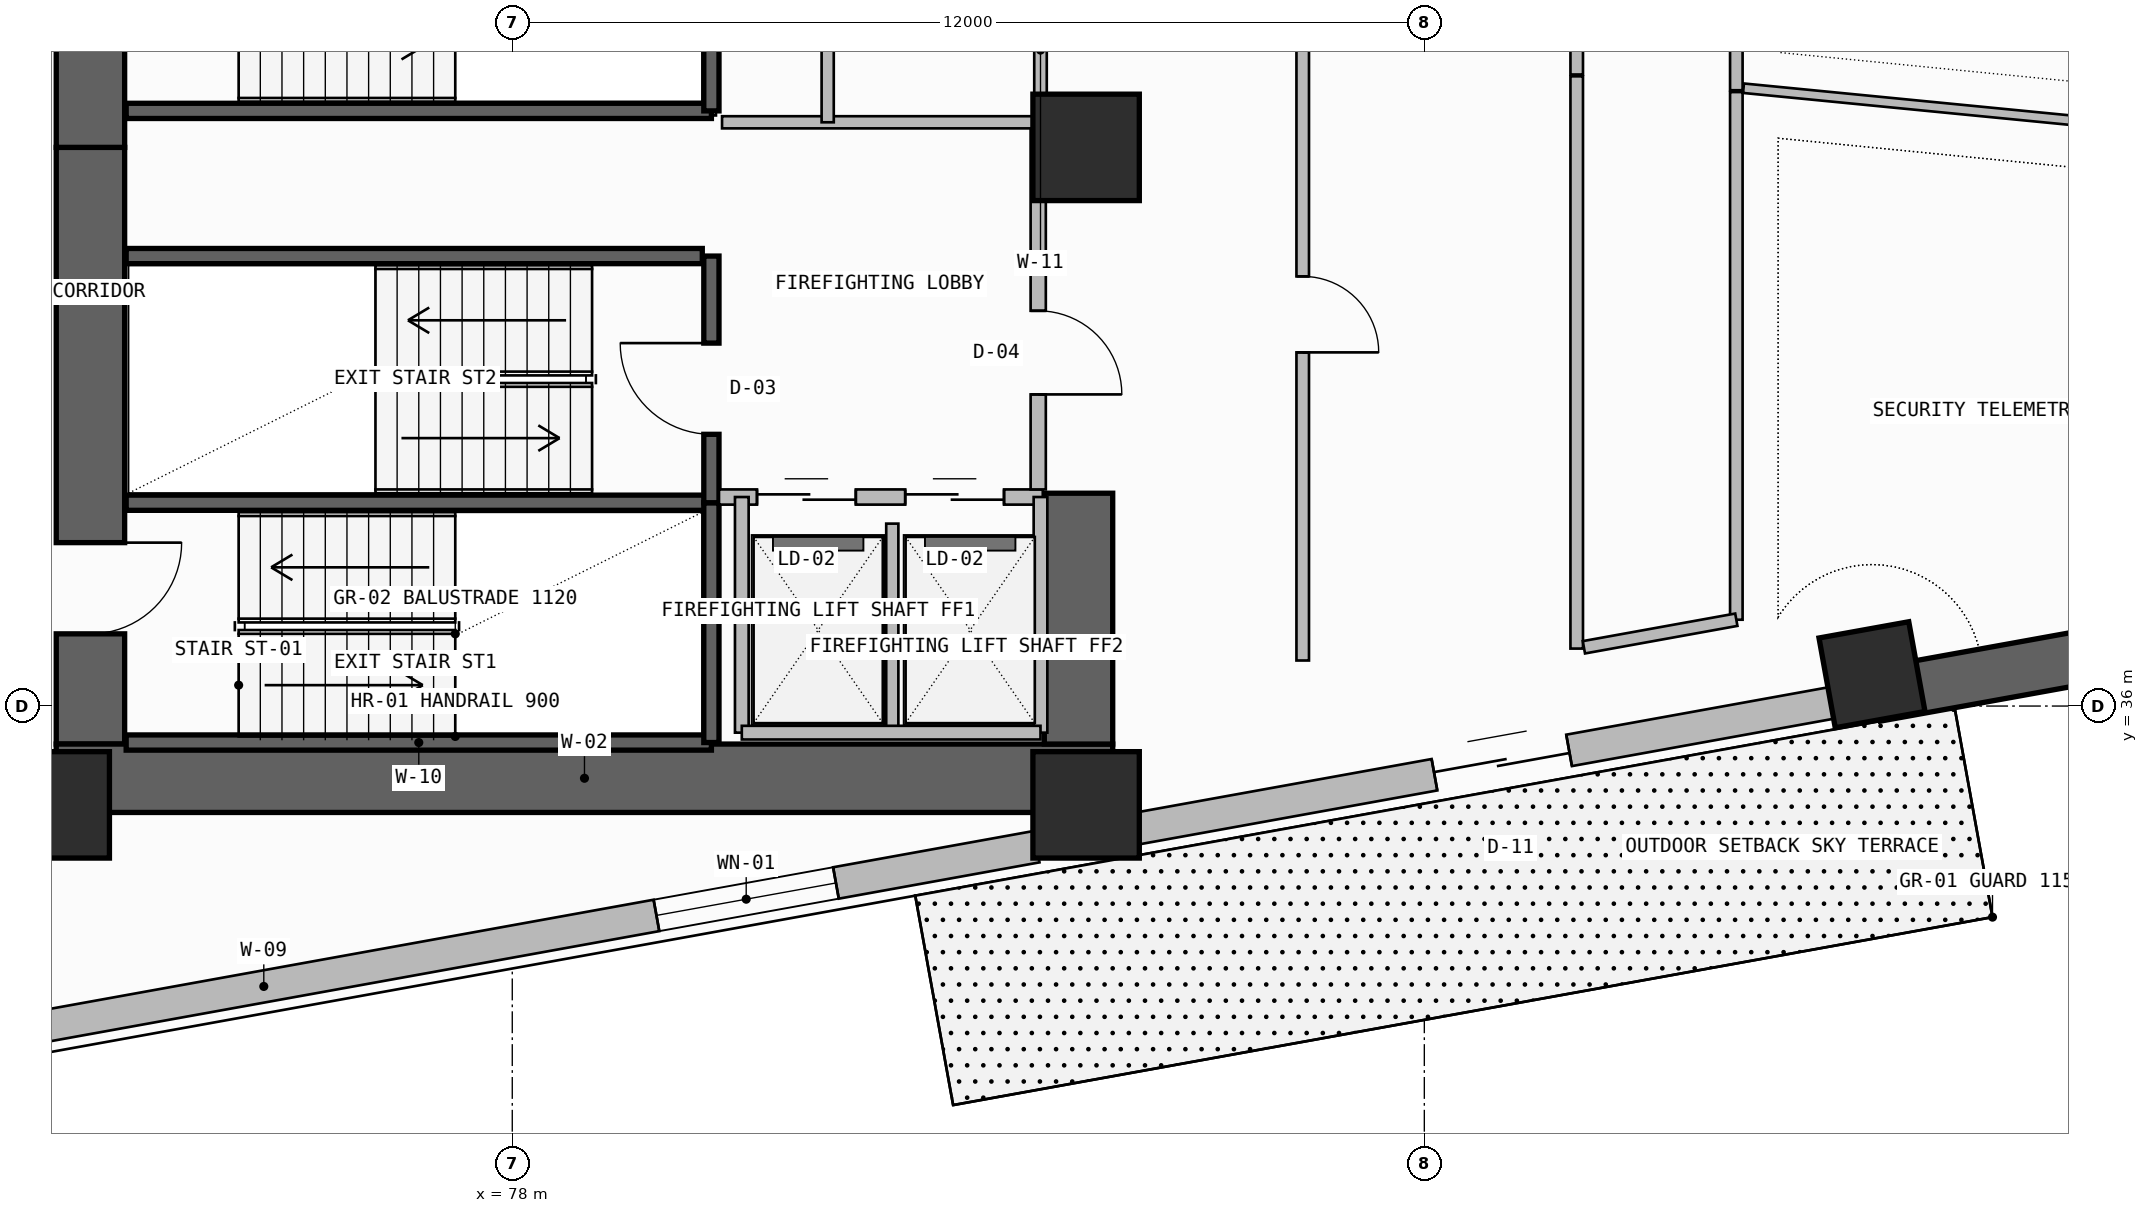
"""IFC4 building model, lengths in metres.
Left out: names, types, materials, properties, quantities, classifications, styles, units other than length and angle.
Written with IfcOpenShell. Run it as: python <this file> out.ifc"""

import sys

from ifc_helpers import new_model, si_unit, direction, frame, frame_2d, origin, origin_2d, place, context, subcontext, project, spatial, rectangle, extrude, element, fill, save


model = new_model("IFC4")
c1 = context("Model", 3, precision=1e-05, world=origin(), true_north=direction((0.0, 1.0)))
c2 = subcontext(c1, "Body", "Model", "MODEL_VIEW")
j1 = project(units=[si_unit("LENGTHUNIT", "METRE"), si_unit("PLANEANGLEUNIT", "RADIAN")], contexts=[c1])
p1 = place(None, origin())
s1 = spatial("IfcSite", under=j1, at=p1, CompositionType="ELEMENT")
p2 = place(p1, origin())
s2 = spatial("IfcBuilding", under=s1, at=p2, CompositionType="ELEMENT")
p3 = place(p2, frame((0.0, 0.0, 95.7)))
s3 = spatial("IfcBuildingStorey", under=s2, at=p3, CompositionType="ELEMENT", Elevation=95.7)
p4 = place(p3, frame((72.45, 35.5, -0.4), z_axis=(0.0, 0.0, 1.0), x_axis=(0.0, 1.0, 0.0)))
e1 = element("IfcWall", 1, at=p4, inside=s3, PredefinedType="SHEAR", context=c2, shape_type="SweptSolid", body=[
    extrude(rectangle(XDim=7.85, YDim=0.9, at=frame_2d((3.925, 0.0))), origin(), (0.0, 0.0, 1.0), 3.74),
])
p5 = place(p4, frame((1.45, 0.0, 0.4)))
e2 = element("IfcOpeningElement", 2, at=p5, cuts=e1, PredefinedType="OPENING", context=c2, shape_type="SweptSolid", body=[
    extrude(rectangle(XDim=1.2, YDim=2.2, at=frame_2d((0.6, 1.1))), frame((0.0, 0.46, 0.0), z_axis=(0.0, -1.0, 0.0), x_axis=(1.0, 0.0, 0.0)), (0.0, 0.0, 1.0), 0.92),
])
p6 = place(p3, frame((72.0, 35.05, -0.4), z_axis=(0.0, 0.0, 1.0), x_axis=(1.0, 0.0, 0.0)))
e3 = element("IfcWall", 3, at=p6, inside=s3, PredefinedType="SHEAR", context=c2, shape_type="SweptSolid", body=[
    extrude(rectangle(XDim=13.9, YDim=0.9, at=frame_2d((6.95, 0.0))), origin(), (0.0, 0.0, 1.0), 3.74),
])
p7 = place(p3, frame((85.45, 35.5, -0.4), z_axis=(0.0, 0.0, 1.0), x_axis=(0.0, 1.0, 0.0)))
e4 = element("IfcWall", 4, at=p7, inside=s3, PredefinedType="SHEAR", context=c2, shape_type="SweptSolid", body=[
    extrude(rectangle(XDim=3.3, YDim=0.9, at=frame_2d((1.65, 0.0))), origin(), (0.0, 0.0, 1.0), 3.74),
])
p8 = place(p3, frame((72.45, 43.35, -0.4), z_axis=(0.0, 0.0, 1.0), x_axis=(0.0, 1.0, 0.0)))
e5 = element("IfcWall", 5, at=p8, inside=s3, PredefinedType="SHEAR", context=c2, shape_type="SweptSolid", body=[
    extrude(rectangle(XDim=12.7, YDim=0.9, at=frame_2d((6.35, 0.0))), origin(), (0.0, 0.0, 1.0), 3.74),
])
p9 = place(p8, frame((1.35, 0.0, 0.4)))
e6 = element("IfcOpeningElement", 6, at=p9, cuts=e5, PredefinedType="OPENING", context=c2, shape_type="SweptSolid", body=[
    extrude(rectangle(XDim=1.2, YDim=2.2, at=frame_2d((0.6, 1.1))), frame((0.0, 0.46, 0.0), z_axis=(0.0, -1.0, 0.0), x_axis=(1.0, 0.0, 0.0)), (0.0, 0.0, 1.0), 0.92),
])
for number, where, z_axis, x_axis in (
    (7, (72.0, 34.7, 0.0), (0.0, 0.0, 1.0), (1.0, 0.0, 0.0)),
    (8, (85.55, 34.7, 0.0), (0.0, 0.0, 1.0), (1.0, 0.0, 0.0)),
    (9, (85.55, 43.35, 0.0), (0.0, 0.0, 1.0), (1.0, 0.0, 0.0)),
):
    element("IfcColumn", number, at=place(p3, frame(where, z_axis=z_axis, x_axis=x_axis)), inside=s3, PredefinedType="COLUMN", context=c2, shape_type="SweptSolid", body=[
        extrude(rectangle(XDim=1.4, YDim=1.4, at=origin_2d()), origin(), (0.0, 0.0, 1.0), 3.6),
    ])
p10 = place(p3, frame((95.89, 36.412, -0.4), z_axis=(0.0, 0.0, 1.0), x_axis=(0.984040697646, 0.177943545474, 0.0)))
e10 = element("IfcColumn", 10, at=p10, inside=s3, PredefinedType="COLUMN", context=c2, shape_type="SweptSolid", body=[
    extrude(rectangle(XDim=1.2, YDim=1.2, at=origin_2d()), origin(), (0.0, 0.0, 1.0), 4.0),
])
p11 = place(p3, frame((69.565, 31.377, 0.0), z_axis=(0.0, 0.0, 1.0), x_axis=(0.98404091451, 0.177942346197, 0.0)))
e11 = element("IfcWall", 11, at=p11, inside=s3, PredefinedType="SOLIDWALL", context=c2, shape_type="SweptSolid", body=[
    extrude(rectangle(XDim=15.583, YDim=0.42, at=frame_2d((7.792, 0.0))), origin(), (0.0, 0.0, 1.0), 3.34),
])
p12 = place(p11, frame((10.5, 0.0, 1.2)))
e12 = element("IfcOpeningElement", 12, at=p12, cuts=e11, PredefinedType="OPENING", context=c2, shape_type="SweptSolid", body=[
    extrude(rectangle(XDim=2.4, YDim=0.9, at=frame_2d((1.2, 0.45))), frame((0.0, 0.22, 0.0), z_axis=(0.0, -1.0, 0.0), x_axis=(1.0, 0.0, 0.0)), (0.0, 0.0, 1.0), 0.44),
])
p13 = place(p3, frame((86.1, 34.367, 0.0), z_axis=(0.0, 0.0, 1.0), x_axis=(0.9840437071, 0.177926902172, 0.0)))
e13 = element("IfcWall", 13, at=p13, inside=s3, PredefinedType="SOLIDWALL", context=c2, shape_type="SweptSolid", body=[
    extrude(rectangle(XDim=9.997, YDim=0.42, at=frame_2d((4.999, 0.0))), origin(), (0.0, 0.0, 1.0), 2.725),
])
p14 = place(p13, frame((4.099, 0.0, 0.0)))
e14 = element("IfcOpeningElement", 14, at=p14, cuts=e13, PredefinedType="OPENING", context=c2, shape_type="SweptSolid", body=[
    extrude(rectangle(XDim=1.8, YDim=2.35, at=frame_2d((0.9, 1.175))), frame((0.0, 0.22, 0.0), z_axis=(0.0, -1.0, 0.0), x_axis=(1.0, 0.0, 0.0)), (0.0, 0.0, 1.0), 0.44),
])
p15 = place(p3, frame((95.938, 36.146, -0.4), z_axis=(0.0, 0.0, 1.0), x_axis=(0.984038488288, 0.177955762952, 0.0)))
e15 = element("IfcWall", 15, at=p15, inside=s3, PredefinedType="SHEAR", context=c2, shape_type="SweptSolid", body=[
    extrude(rectangle(XDim=16.525, YDim=0.7, at=frame_2d((8.262, 0.0))), origin(), (0.0, 0.0, 1.0), 3.74),
])
p16 = place(p15, frame((11.2, 0.0, 1.2)))
e16 = element("IfcOpeningElement", 16, at=p16, cuts=e15, PredefinedType="OPENING", context=c2, shape_type="SweptSolid", body=[
    extrude(rectangle(XDim=2.4, YDim=0.9, at=frame_2d((1.2, 0.45))), frame((0.0, 0.36, 0.0), z_axis=(0.0, -1.0, 0.0), x_axis=(1.0, 0.0, 0.0)), (0.0, 0.0, 1.0), 0.72),
])
p17 = place(p3, frame((119.865, 43.07, 0.0), z_axis=(0.0, 0.0, 1.0), x_axis=(-0.852110824326, 0.52336138859, 0.0)))
e17 = element("IfcWall", 17, at=p17, inside=s3, PredefinedType="PARAPET", context=c2, shape_type="SweptSolid", body=[
    extrude(rectangle(XDim=33.932, YDim=0.2, at=frame_2d((16.966, 0.0))), origin(), (0.0, 0.0, 1.0), 1.15),
])
for number, where, z_axis, x_axis in (
    (18, (72.92, 35.52, -0.4), (0.0, 0.0, 1.0), (1.0, 0.0, 0.0)),
    (19, (72.92, 38.675, -0.4), (0.0, 0.0, 1.0), (1.0, 0.0, 0.0)),
):
    element("IfcWall", number, at=place(p3, frame(where, z_axis=z_axis, x_axis=x_axis)), inside=s3, PredefinedType="SOLIDWALL", context=c2, shape_type="SweptSolid", body=[
        extrude(rectangle(XDim=7.7, YDim=0.2, at=frame_2d((3.85, 0.0))), origin(), (0.0, 0.0, 1.0), 3.74),
    ])
p18 = place(p3, frame((80.62, 35.52, -0.4), z_axis=(0.0, 0.0, 1.0), x_axis=(0.0, 1.0, 0.0)))
e20 = element("IfcWall", 20, at=p18, inside=s3, PredefinedType="SOLIDWALL", context=c2, shape_type="SweptSolid", body=[
    extrude(rectangle(XDim=3.155, YDim=0.2, at=frame_2d((1.578, 0.0))), origin(), (0.0, 0.0, 1.0), 3.74),
])
p19 = place(p3, frame((80.62, 38.675, -0.4), z_axis=(0.0, 0.0, 1.0), x_axis=(0.0, 1.0, 0.0)))
e21 = element("IfcWall", 21, at=p19, inside=s3, PredefinedType="SOLIDWALL", context=c2, shape_type="SweptSolid", body=[
    extrude(rectangle(XDim=3.245, YDim=0.2, at=frame_2d((1.623, 0.0))), origin(), (0.0, 0.0, 1.0), 3.74),
])
p20 = place(p19, frame((0.9, 0.0, 0.4)))
e22 = element("IfcOpeningElement", 22, at=p20, cuts=e21, PredefinedType="OPENING", context=c2, shape_type="SweptSolid", body=[
    extrude(rectangle(XDim=1.2, YDim=2.2, at=frame_2d((0.6, 1.1))), frame((0.0, 0.11, 0.0), z_axis=(0.0, -1.0, 0.0), x_axis=(1.0, 0.0, 0.0)), (0.0, 0.0, 1.0), 0.22),
])
p21 = place(p3, frame((80.72, 38.75, 0.0), z_axis=(0.0, 0.0, 1.0), x_axis=(1.0, 0.0, 0.0)))
e23 = element("IfcWall", 23, at=p21, inside=s3, PredefinedType="SOLIDWALL", context=c2, shape_type="SweptSolid", body=[
    extrude(rectangle(XDim=4.26, YDim=0.2, at=frame_2d((2.13, 0.0))), origin(), (0.0, 0.0, 1.0), 3.34),
])
p22 = place(p21, frame((0.5, 0.0, 0.0)))
e24 = element("IfcOpeningElement", 24, at=p22, cuts=e23, PredefinedType="OPENING", context=c2, shape_type="SweptSolid", body=[
    extrude(rectangle(XDim=1.3, YDim=2.3, at=frame_2d((0.65, 1.15))), frame((0.0, 0.11, 0.0), z_axis=(0.0, -1.0, 0.0), x_axis=(1.0, 0.0, 0.0)), (0.0, 0.0, 1.0), 0.22),
])
p23 = place(p21, frame((2.45, 0.0, 0.0)))
e25 = element("IfcOpeningElement", 25, at=p23, cuts=e23, PredefinedType="OPENING", context=c2, shape_type="SweptSolid", body=[
    extrude(rectangle(XDim=1.3, YDim=2.3, at=frame_2d((0.65, 1.15))), frame((0.0, 0.11, 0.0), z_axis=(0.0, -1.0, 0.0), x_axis=(1.0, 0.0, 0.0)), (0.0, 0.0, 1.0), 0.22),
])
p24 = place(p3, frame((83.0, 35.65, 0.0), z_axis=(0.0, 0.0, 1.0), x_axis=(0.0, 1.0, 0.0)))
e26 = element("IfcWall", 26, at=p24, inside=s3, PredefinedType="PLUMBINGWALL", context=c2, shape_type="SweptSolid", body=[
    extrude(rectangle(XDim=2.75, YDim=0.16, at=frame_2d((1.375, 0.0))), origin(), (0.0, 0.0, 1.0), 3.34),
])
for number, where, z_axis, x_axis in (
    (27, (84.95, 35.65, 0.0), (0.0, 0.0, 1.0), (0.0, 1.0, 0.0)),
    (28, (81.02, 35.65, 0.0), (0.0, 0.0, 1.0), (0.0, 1.0, 0.0)),
):
    element("IfcWall", number, at=place(p3, frame(where, z_axis=z_axis, x_axis=x_axis)), inside=s3, PredefinedType="SOLIDWALL", context=c2, shape_type="SweptSolid", body=[
        extrude(rectangle(XDim=3.1, YDim=0.18, at=frame_2d((1.55, 0.0))), origin(), (0.0, 0.0, 1.0), 3.34),
    ])
p25 = place(p3, frame((81.02, 35.65, 0.0), z_axis=(0.0, 0.0, 1.0), x_axis=(1.0, 0.0, 0.0)))
e29 = element("IfcWall", 29, at=p25, inside=s3, PredefinedType="SOLIDWALL", context=c2, shape_type="SweptSolid", body=[
    extrude(rectangle(XDim=3.93, YDim=0.18, at=frame_2d((1.965, 0.0))), origin(), (0.0, 0.0, 1.0), 3.34),
])
p26 = place(p3, frame((84.92, 38.85, 0.0), z_axis=(0.0, 0.0, 1.0), x_axis=(0.0, 1.0, 0.0)))
e30 = element("IfcWall", 30, at=p26, inside=s3, PredefinedType="SOLIDWALL", context=c2, shape_type="SweptSolid", body=[
    extrude(rectangle(XDim=4.83, YDim=0.2, at=frame_2d((2.415, 0.0))), origin(), (0.0, 0.0, 1.0), 3.34),
])
p27 = place(p26, frame((1.25, 0.0, 0.0)))
e31 = element("IfcOpeningElement", 31, at=p27, cuts=e30, PredefinedType="OPENING", context=c2, shape_type="SweptSolid", body=[
    extrude(rectangle(XDim=1.1, YDim=2.2, at=frame_2d((0.55, 1.1))), frame((0.0, 0.11, 0.0), z_axis=(0.0, -1.0, 0.0), x_axis=(1.0, 0.0, 0.0)), (0.0, 0.0, 1.0), 0.22),
])
p28 = place(p3, frame((72.92, 41.92, -0.4), z_axis=(0.0, 0.0, 1.0), x_axis=(1.0, 0.0, 0.0)))
e32 = element("IfcWall", 32, at=p28, inside=s3, PredefinedType="SOLIDWALL", context=c2, shape_type="SweptSolid", body=[
    extrude(rectangle(XDim=7.58, YDim=0.2, at=frame_2d((3.79, 0.0))), origin(), (0.0, 0.0, 1.0), 3.74),
])
p29 = place(p3, frame((72.92, 43.83, -0.4), z_axis=(0.0, 0.0, 1.0), x_axis=(1.0, 0.0, 0.0)))
e33 = element("IfcWall", 33, at=p29, inside=s3, PredefinedType="SOLIDWALL", context=c2, shape_type="SweptSolid", body=[
    extrude(rectangle(XDim=7.7, YDim=0.2, at=frame_2d((3.85, 0.0))), origin(), (0.0, 0.0, 1.0), 3.74),
])
p30 = place(p3, frame((80.62, 43.83, -0.4), z_axis=(0.0, 0.0, 1.0), x_axis=(0.0, 1.0, 0.0)))
e34 = element("IfcWall", 34, at=p30, inside=s3, PredefinedType="SOLIDWALL", context=c2, shape_type="SweptSolid", body=[
    extrude(rectangle(XDim=3.24, YDim=0.2, at=frame_2d((1.62, 0.0))), origin(), (0.0, 0.0, 1.0), 3.74),
])
p31 = place(p3, frame((84.95, 43.68, 0.0), z_axis=(0.0, 0.0, 1.0), x_axis=(0.0, 1.0, 0.0)))
e35 = element("IfcWall", 35, at=p31, inside=s3, PredefinedType="PLUMBINGWALL", context=c2, shape_type="SweptSolid", body=[
    extrude(rectangle(XDim=1.9, YDim=0.165, at=frame_2d((0.95, 0.0))), origin(), (0.0, 0.0, 1.0), 3.34),
])
p32 = place(p3, frame((80.76, 43.68, 0.0), z_axis=(0.0, 0.0, 1.0), x_axis=(1.0, 0.0, 0.0)))
e36 = element("IfcWall", 36, at=p32, inside=s3, PredefinedType="PLUMBINGWALL", context=c2, shape_type="SweptSolid", body=[
    extrude(rectangle(XDim=4.19, YDim=0.16, at=frame_2d((2.095, 0.0))), origin(), (0.0, 0.0, 1.0), 3.34),
])
p33 = place(p3, frame((82.15, 43.68, 0.0), z_axis=(0.0, 0.0, 1.0), x_axis=(0.0, 1.0, 0.0)))
e37 = element("IfcWall", 37, at=p33, inside=s3, PredefinedType="PLUMBINGWALL", context=c2, shape_type="SweptSolid", body=[
    extrude(rectangle(XDim=1.9, YDim=0.16, at=frame_2d((0.95, 0.0))), origin(), (0.0, 0.0, 1.0), 3.34),
])
p34 = place(p3, frame((94.105, 44.102, 0.0), z_axis=(0.0, 0.0, 1.0), x_axis=(0.0, 1.0, 0.0)))
e38 = element("IfcWall", 38, at=p34, inside=s3, PredefinedType="PARTITIONING", context=c2, shape_type="SweptSolid", body=[
    extrude(rectangle(XDim=6.942, YDim=0.165, at=frame_2d((3.471, 0.0))), origin(), (0.0, 0.0, 1.0), 2.725),
])
p35 = place(p34, frame((2.971, 0.0, 0.0)))
e39 = element("IfcOpeningElement", 39, at=p35, cuts=e38, PredefinedType="OPENING", context=c2, shape_type="SweptSolid", body=[
    extrude(rectangle(XDim=1.0, YDim=2.2, at=frame_2d((0.5, 1.1))), frame((0.0, 0.093, 0.0), z_axis=(0.0, -1.0, 0.0), x_axis=(1.0, 0.0, 0.0)), (0.0, 0.0, 1.0), 0.185),
])
p36 = place(p3, frame((118.119, 41.79, 0.0), z_axis=(0.0, 0.0, 1.0), x_axis=(-0.995255314979, 0.097297780071, 0.0)))
e40 = element("IfcWall", 40, at=p36, inside=s3, PredefinedType="PARTITIONING", context=c2, shape_type="SweptSolid", body=[
    extrude(rectangle(XDim=24.033, YDim=0.125, at=frame_2d((12.017, 0.0))), origin(), (0.0, 0.0, 1.0), 2.725),
])
p37 = place(p3, frame((88.4, 36.599, 0.0), z_axis=(0.0, 0.0, 1.0), x_axis=(0.0, 1.0, 0.0)))
e41 = element("IfcWall", 41, at=p37, inside=s3, PredefinedType="PARTITIONING", context=c2, shape_type="SweptSolid", body=[
    extrude(rectangle(XDim=12.411, YDim=0.165, at=frame_2d((6.205, 0.0))), origin(), (0.0, 0.0, 1.0), 2.725),
])
p38 = place(p37, frame((4.054, 0.0, 0.0)))
e42 = element("IfcOpeningElement", 42, at=p38, cuts=e41, PredefinedType="OPENING", context=c2, shape_type="SweptSolid", body=[
    extrude(rectangle(XDim=1.0, YDim=2.2, at=frame_2d((0.5, 1.1))), frame((0.0, 0.093, 0.0), z_axis=(0.0, -1.0, 0.0), x_axis=(1.0, 0.0, 0.0)), (0.0, 0.0, 1.0), 0.185),
])
p39 = place(p3, frame((92.005, 44.285, 0.0), z_axis=(0.0, 0.0, 1.0), x_axis=(0.0, -1.0, 0.0)))
e43 = element("IfcWall", 43, at=p39, inside=s3, PredefinedType="PARTITIONING", context=c2, shape_type="SweptSolid", body=[
    extrude(rectangle(XDim=7.529, YDim=0.165, at=frame_2d((3.764, 0.0))), origin(), (0.0, 0.0, 1.0), 2.725),
])
p40 = place(p3, frame((94.105, 37.136, 0.0), z_axis=(0.0, 0.0, 1.0), x_axis=(0.0, 1.0, 0.0)))
e44 = element("IfcWall", 44, at=p40, inside=s3, PredefinedType="PARTITIONING", context=c2, shape_type="SweptSolid", body=[
    extrude(rectangle(XDim=6.942, YDim=0.165, at=frame_2d((3.471, 0.0))), origin(), (0.0, 0.0, 1.0), 2.725),
])
p41 = place(p3, frame((92.005, 50.295, 0.0), z_axis=(0.0, 0.0, 1.0), x_axis=(0.0, -1.0, 0.0)))
e45 = element("IfcWall", 45, at=p41, inside=s3, PredefinedType="PARTITIONING", context=c2, shape_type="SweptSolid", body=[
    extrude(rectangle(XDim=5.986, YDim=0.165, at=frame_2d((2.993, 0.0))), origin(), (0.0, 0.0, 1.0), 2.725),
])
p42 = place(p3, frame((92.1, 36.773, 0.0), z_axis=(0.0, 0.0, 1.0), x_axis=(0.984047685875, 0.17790489573, 0.0)))
e46 = element("IfcWall", 46, at=p42, inside=s3, PredefinedType="PARTITIONING", context=c2, shape_type="SweptSolid", body=[
    extrude(rectangle(XDim=2.038, YDim=0.165, at=frame_2d((1.019, 0.0))), origin(), (0.0, 0.0, 1.0), 3.34),
])
p43 = place(p12, origin())
e47 = element("IfcWindow", 47, at=p43, inside=s3, PartitioningType="SINGLE_PANEL", PredefinedType="WINDOW", context=c2, shape_type="SweptSolid", body=[
    extrude(rectangle(XDim=2.4, YDim=0.9, at=frame_2d((1.2, 0.45))), frame((0.0, 0.03, 0.0), z_axis=(0.0, -1.0, 0.0), x_axis=(1.0, 0.0, 0.0)), (0.0, 0.0, 1.0), 0.06),
])
fill(e12, e47)
p44 = place(p14, origin())
e48 = element("IfcDoor", 48, at=p44, inside=s3, OperationType="DOUBLE_DOOR_SLIDING", PredefinedType="DOOR", context=c2, shape_type="SweptSolid", body=[
    extrude(rectangle(XDim=1.8, YDim=2.35, at=frame_2d((0.9, 1.175))), frame((0.0, 0.025, 0.0), z_axis=(0.0, -1.0, 0.0), x_axis=(1.0, 0.0, 0.0)), (0.0, 0.0, 1.0), 0.05),
])
fill(e14, e48)
p45 = place(p5, frame((1.2, 0.0, 0.0), z_axis=(0.0, 0.0, 1.0), x_axis=(-1.0, 0.0, 0.0)))
e49 = element("IfcDoor", 49, at=p45, inside=s3, OperationType="SINGLE_SWING_LEFT", PredefinedType="USERDEFINED", context=c2, shape_type="SweptSolid", body=[
    extrude(rectangle(XDim=1.2, YDim=2.2, at=frame_2d((0.6, 1.1))), frame((0.0, 0.025, 0.0), z_axis=(0.0, -1.0, 0.0), x_axis=(1.0, 0.0, 0.0)), (0.0, 0.0, 1.0), 0.05),
])
fill(e2, e49)
p46 = place(p20, origin())
e50 = element("IfcDoor", 50, at=p46, inside=s3, OperationType="SINGLE_SWING_RIGHT", PredefinedType="USERDEFINED", context=c2, shape_type="SweptSolid", body=[
    extrude(rectangle(XDim=1.2, YDim=2.2, at=frame_2d((0.6, 1.1))), frame((0.0, 0.025, 0.0), z_axis=(0.0, -1.0, 0.0), x_axis=(1.0, 0.0, 0.0)), (0.0, 0.0, 1.0), 0.05),
])
fill(e22, e50)
p47 = place(p22, origin())
e51 = element("IfcDoor", 51, at=p47, inside=s3, OperationType="DOUBLE_DOOR_SLIDING", PredefinedType="DOOR", context=c2, shape_type="SweptSolid", body=[
    extrude(rectangle(XDim=1.3, YDim=2.3, at=frame_2d((0.65, 1.15))), frame((0.0, 0.025, 0.0), z_axis=(0.0, -1.0, 0.0), x_axis=(1.0, 0.0, 0.0)), (0.0, 0.0, 1.0), 0.05),
])
fill(e24, e51)
p48 = place(p23, origin())
e52 = element("IfcDoor", 52, at=p48, inside=s3, OperationType="DOUBLE_DOOR_SLIDING", PredefinedType="DOOR", context=c2, shape_type="SweptSolid", body=[
    extrude(rectangle(XDim=1.3, YDim=2.3, at=frame_2d((0.65, 1.15))), frame((0.0, 0.025, 0.0), z_axis=(0.0, -1.0, 0.0), x_axis=(1.0, 0.0, 0.0)), (0.0, 0.0, 1.0), 0.05),
])
fill(e25, e52)
p49 = place(p27, frame((1.1, 0.0, 0.0), z_axis=(0.0, 0.0, 1.0), x_axis=(-1.0, 0.0, 0.0)))
e53 = element("IfcDoor", 53, at=p49, inside=s3, OperationType="SINGLE_SWING_RIGHT", PredefinedType="DOOR", context=c2, shape_type="SweptSolid", body=[
    extrude(rectangle(XDim=1.1, YDim=2.2, at=frame_2d((0.55, 1.1))), frame((0.0, 0.025, 0.0), z_axis=(0.0, -1.0, 0.0), x_axis=(1.0, 0.0, 0.0)), (0.0, 0.0, 1.0), 0.05),
])
fill(e31, e53)
p50 = place(p38, frame((1.0, 0.0, 0.0), z_axis=(0.0, 0.0, 1.0), x_axis=(-1.0, 0.0, 0.0)))
e54 = element("IfcDoor", 54, at=p50, inside=s3, OperationType="SINGLE_SWING_RIGHT", PredefinedType="DOOR", context=c2, shape_type="SweptSolid", body=[
    extrude(rectangle(XDim=1.0, YDim=2.2, at=frame_2d((0.5, 1.1))), frame((0.0, 0.025, 0.0), z_axis=(0.0, -1.0, 0.0), x_axis=(1.0, 0.0, 0.0)), (0.0, 0.0, 1.0), 0.05),
])
fill(e42, e54)
save(model, sys.argv[1])
